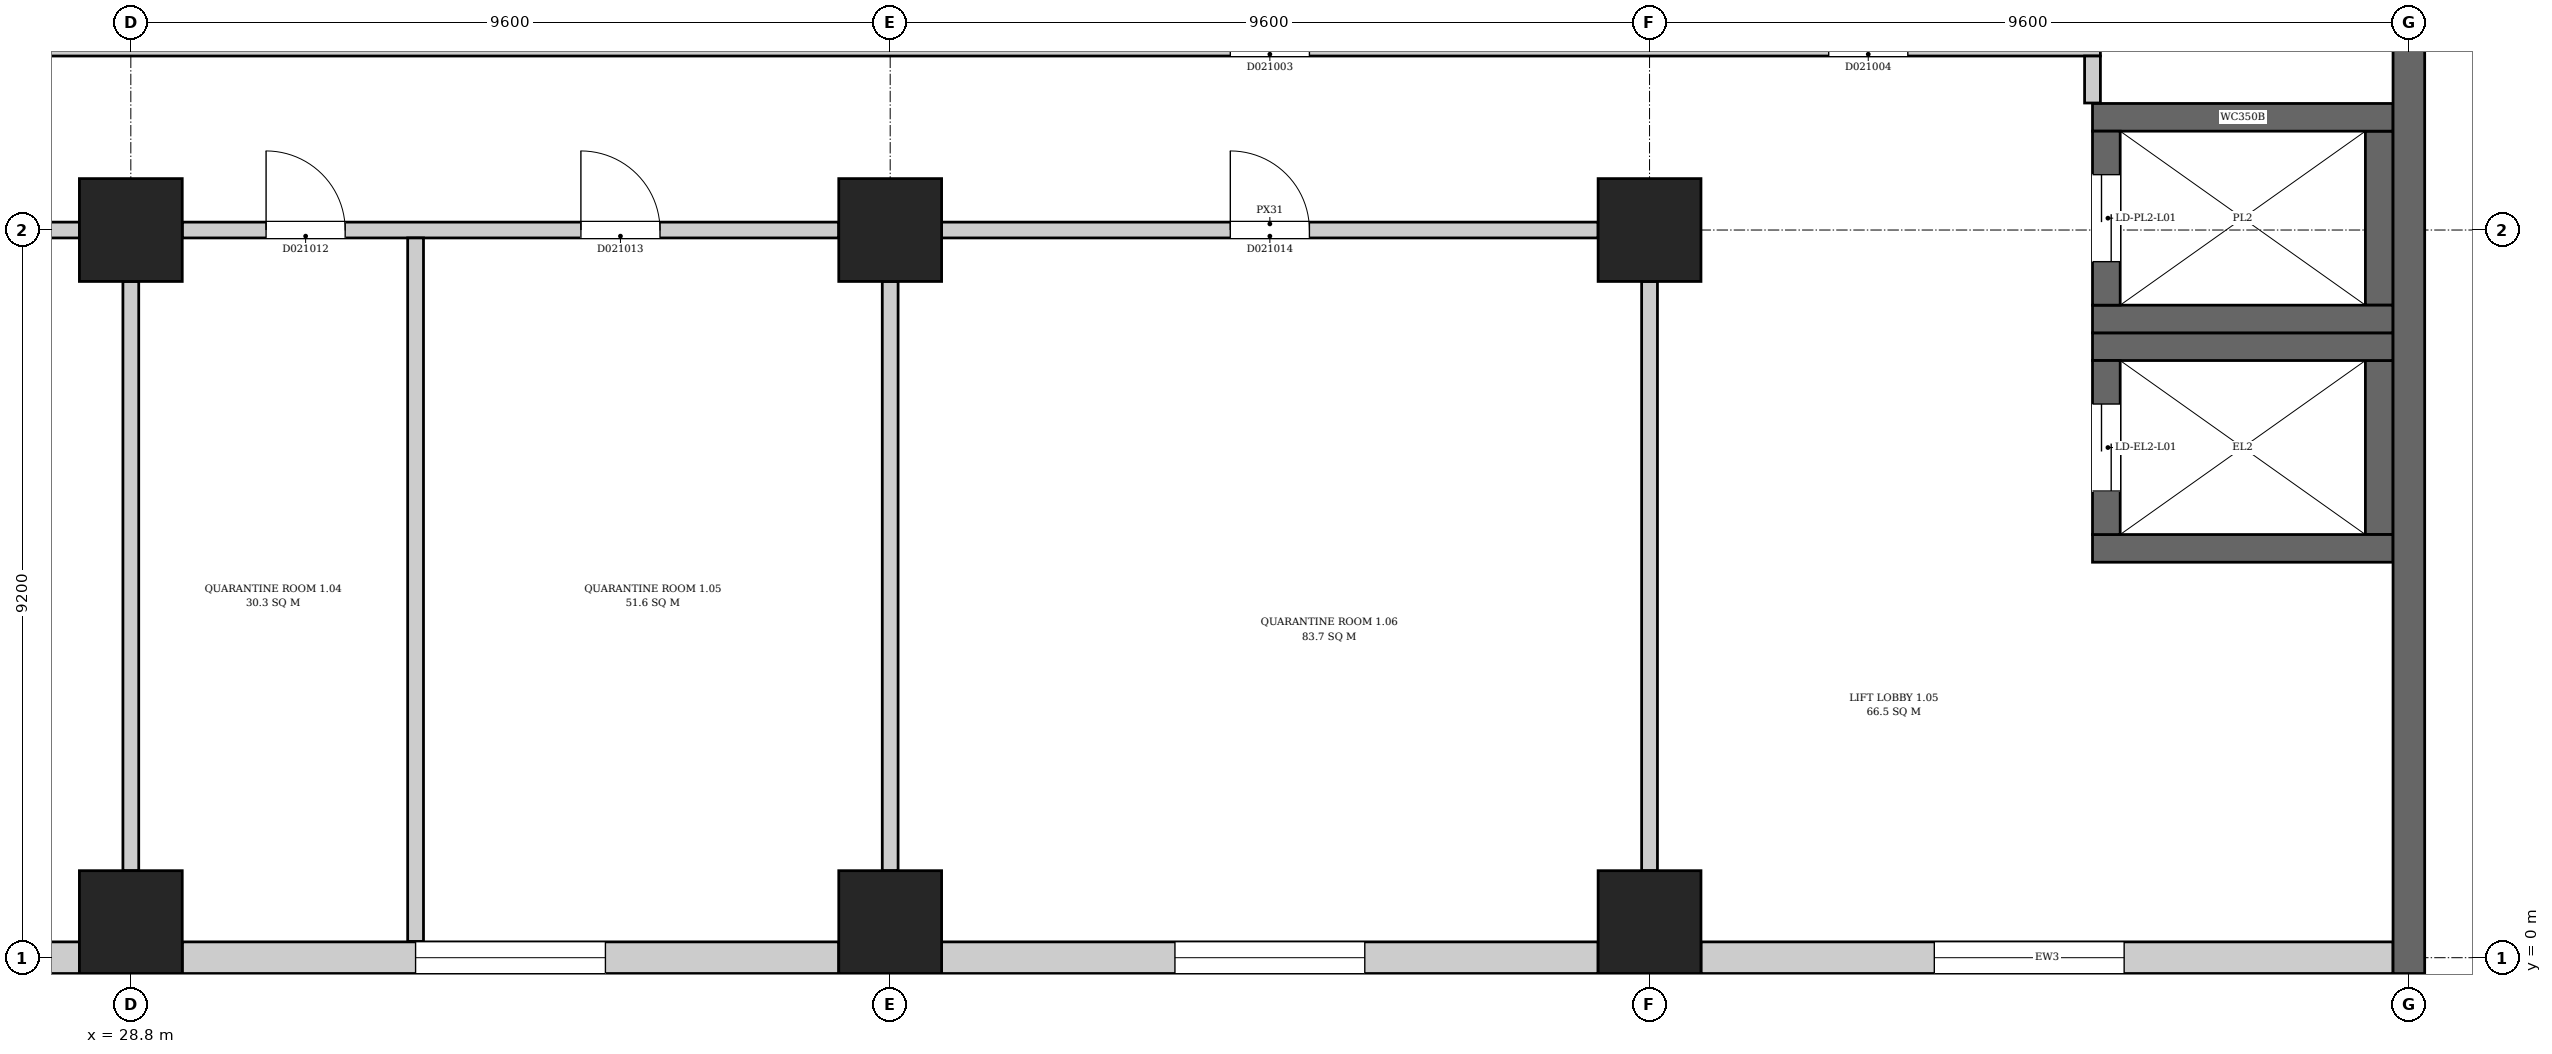
"""IFC4 building model, lengths in metres.
Left out: names, types, materials, properties, quantities, classifications, styles, units other than length and angle.
Written with IfcOpenShell. Run it as: python <this file> out.ifc"""

import sys

from ifc_helpers import new_model, si_unit, direction, frame, frame_2d, origin, origin_2d, place, context, subcontext, project, spatial, rectangle, extrude, element, fill, save


model = new_model("IFC4")
c1 = context("Model", 3, precision=1e-05, world=origin(), true_north=direction((0.0, 1.0)))
c2 = subcontext(c1, "Body", "Model", "MODEL_VIEW")
j1 = project(units=[si_unit("LENGTHUNIT", "METRE"), si_unit("PLANEANGLEUNIT", "RADIAN")], contexts=[c1])
p1 = place(None, origin())
s1 = spatial("IfcSite", under=j1, at=p1, CompositionType="ELEMENT")
p2 = place(p1, origin())
s2 = spatial("IfcBuilding", under=s1, at=p2, CompositionType="ELEMENT")
p3 = place(p2, frame((0.0, 0.0, 6.5)))
s3 = spatial("IfcBuildingStorey", under=s2, at=p3, CompositionType="ELEMENT", Elevation=6.5)
p4 = place(p3, frame((57.6, -0.2, 0.0), z_axis=(0.0, 0.0, 1.0), x_axis=(0.0, 1.0, 0.0)))
e1 = element("IfcWall", 1, at=p4, inside=s3, PredefinedType="SHEAR", context=c2, shape_type="SweptSolid", body=[
    extrude(rectangle(XDim=46.88, YDim=0.4, at=frame_2d((23.44, 0.0))), origin(), (0.0, 0.0, 1.0), 7.7),
])
for number, where, z_axis, x_axis in (
    (2, (53.6, 5.175, 0.0), (0.0, 0.0, 1.0), (1.0, 0.0, 0.0)),
    (3, (53.6, 7.725, 0.0), (0.0, 0.0, 1.0), (1.0, 0.0, 0.0)),
):
    element("IfcWall", number, at=place(p3, frame(where, z_axis=z_axis, x_axis=x_axis)), inside=s3, PredefinedType="SHEAR", context=c2, shape_type="SweptSolid", body=[
        extrude(rectangle(XDim=3.8, YDim=0.35, at=frame_2d((1.9, 0.0))), origin(), (0.0, 0.0, 1.0), 7.7),
    ])
p5 = place(p3, frame((53.775, 5.35, 0.0), z_axis=(0.0, 0.0, 1.0), x_axis=(0.0, 1.0, 0.0)))
e4 = element("IfcWall", 4, at=p5, inside=s3, PredefinedType="SHEAR", context=c2, shape_type="SweptSolid", body=[
    extrude(rectangle(XDim=2.2, YDim=0.35, at=frame_2d((1.1, 0.0))), origin(), (0.0, 0.0, 1.0), 7.7),
])
p6 = place(p5, frame((0.55, 0.0, 0.0)))
e5 = element("IfcOpeningElement", 5, at=p6, cuts=e4, PredefinedType="OPENING", context=c2, shape_type="SweptSolid", body=[
    extrude(rectangle(XDim=1.1, YDim=2.1, at=frame_2d((0.55, 1.05))), frame((0.0, 0.185, 0.0), z_axis=(0.0, -1.0, 0.0), x_axis=(1.0, 0.0, 0.0)), (0.0, 0.0, 1.0), 0.37),
])
p7 = place(p3, frame((57.225, 5.35, 0.0), z_axis=(0.0, 0.0, 1.0), x_axis=(0.0, 1.0, 0.0)))
e6 = element("IfcWall", 6, at=p7, inside=s3, PredefinedType="SHEAR", context=c2, shape_type="SweptSolid", body=[
    extrude(rectangle(XDim=2.2, YDim=0.35, at=frame_2d((1.1, 0.0))), origin(), (0.0, 0.0, 1.0), 7.7),
])
for number, where, z_axis, x_axis in (
    (7, (53.6, 8.075, 0.0), (0.0, 0.0, 1.0), (1.0, 0.0, 0.0)),
    (8, (53.6, 10.625, 0.0), (0.0, 0.0, 1.0), (1.0, 0.0, 0.0)),
):
    element("IfcWall", number, at=place(p3, frame(where, z_axis=z_axis, x_axis=x_axis)), inside=s3, PredefinedType="SHEAR", context=c2, shape_type="SweptSolid", body=[
        extrude(rectangle(XDim=3.8, YDim=0.35, at=frame_2d((1.9, 0.0))), origin(), (0.0, 0.0, 1.0), 7.7),
    ])
p8 = place(p3, frame((53.775, 8.25, 0.0), z_axis=(0.0, 0.0, 1.0), x_axis=(0.0, 1.0, 0.0)))
e9 = element("IfcWall", 9, at=p8, inside=s3, PredefinedType="SHEAR", context=c2, shape_type="SweptSolid", body=[
    extrude(rectangle(XDim=2.2, YDim=0.35, at=frame_2d((1.1, 0.0))), origin(), (0.0, 0.0, 1.0), 7.7),
])
p9 = place(p8, frame((0.55, 0.0, 0.0)))
e10 = element("IfcOpeningElement", 10, at=p9, cuts=e9, PredefinedType="OPENING", context=c2, shape_type="SweptSolid", body=[
    extrude(rectangle(XDim=1.1, YDim=2.1, at=frame_2d((0.55, 1.05))), frame((0.0, 0.185, 0.0), z_axis=(0.0, -1.0, 0.0), x_axis=(1.0, 0.0, 0.0)), (0.0, 0.0, 1.0), 0.37),
])
p10 = place(p3, frame((57.225, 8.25, 0.0), z_axis=(0.0, 0.0, 1.0), x_axis=(0.0, 1.0, 0.0)))
e11 = element("IfcWall", 11, at=p10, inside=s3, PredefinedType="SHEAR", context=c2, shape_type="SweptSolid", body=[
    extrude(rectangle(XDim=2.2, YDim=0.35, at=frame_2d((1.1, 0.0))), origin(), (0.0, 0.0, 1.0), 7.7),
])
for number, where, z_axis, x_axis in (
    (12, (28.8, 0.45, 0.0), (0.0, 0.0, 1.0), (1.0, 0.0, 0.0)),
    (13, (38.4, 0.45, 0.0), (0.0, 0.0, 1.0), (1.0, 0.0, 0.0)),
    (14, (48.0, 0.45, 0.0), (0.0, 0.0, 1.0), (1.0, 0.0, 0.0)),
    (15, (28.8, 9.2, 0.0), (0.0, 0.0, 1.0), (1.0, 0.0, 0.0)),
    (16, (38.4, 9.2, 0.0), (0.0, 0.0, 1.0), (1.0, 0.0, 0.0)),
    (17, (48.0, 9.2, 0.0), (0.0, 0.0, 1.0), (1.0, 0.0, 0.0)),
):
    element("IfcColumn", number, at=place(p3, frame(where, z_axis=z_axis, x_axis=x_axis)), inside=s3, PredefinedType="COLUMN", context=c2, shape_type="SweptSolid", body=[
        extrude(rectangle(XDim=1.3, YDim=1.3, at=origin_2d()), origin(), (0.0, 0.0, 1.0), 7.7),
    ])
p11 = place(p3, frame((19.85, 0.0, 0.0), z_axis=(0.0, 0.0, 1.0), x_axis=(1.0, 0.0, 0.0)))
e18 = element("IfcWall", 18, at=p11, inside=s3, PredefinedType="ELEMENTEDWALL", context=c2, shape_type="SweptSolid", body=[
    extrude(rectangle(XDim=8.3, YDim=0.4, at=frame_2d((4.15, 0.0))), origin(), (0.0, 0.0, 1.0), 7.35),
])
p12 = place(p11, frame((2.95, 0.0, 1.0)))
e19 = element("IfcOpeningElement", 19, at=p12, cuts=e18, PredefinedType="OPENING", context=c2, shape_type="SweptSolid", body=[
    extrude(rectangle(XDim=2.4, YDim=2.2, at=frame_2d((1.2, 1.1))), frame((0.0, 0.21, 0.0), z_axis=(0.0, -1.0, 0.0), x_axis=(1.0, 0.0, 0.0)), (0.0, 0.0, 1.0), 0.42),
])
p13 = place(p3, frame((29.45, 0.0, 0.0), z_axis=(0.0, 0.0, 1.0), x_axis=(1.0, 0.0, 0.0)))
e20 = element("IfcWall", 20, at=p13, inside=s3, PredefinedType="ELEMENTEDWALL", context=c2, shape_type="SweptSolid", body=[
    extrude(rectangle(XDim=8.3, YDim=0.4, at=frame_2d((4.15, 0.0))), origin(), (0.0, 0.0, 1.0), 7.35),
])
p14 = place(p13, frame((2.95, 0.0, 1.0)))
e21 = element("IfcOpeningElement", 21, at=p14, cuts=e20, PredefinedType="OPENING", context=c2, shape_type="SweptSolid", body=[
    extrude(rectangle(XDim=2.4, YDim=2.2, at=frame_2d((1.2, 1.1))), frame((0.0, 0.21, 0.0), z_axis=(0.0, -1.0, 0.0), x_axis=(1.0, 0.0, 0.0)), (0.0, 0.0, 1.0), 0.42),
])
p15 = place(p3, frame((39.05, 0.0, 0.0), z_axis=(0.0, 0.0, 1.0), x_axis=(1.0, 0.0, 0.0)))
e22 = element("IfcWall", 22, at=p15, inside=s3, PredefinedType="ELEMENTEDWALL", context=c2, shape_type="SweptSolid", body=[
    extrude(rectangle(XDim=8.3, YDim=0.4, at=frame_2d((4.15, 0.0))), origin(), (0.0, 0.0, 1.0), 7.35),
])
p16 = place(p15, frame((2.95, 0.0, 1.0)))
e23 = element("IfcOpeningElement", 23, at=p16, cuts=e22, PredefinedType="OPENING", context=c2, shape_type="SweptSolid", body=[
    extrude(rectangle(XDim=2.4, YDim=2.2, at=frame_2d((1.2, 1.1))), frame((0.0, 0.21, 0.0), z_axis=(0.0, -1.0, 0.0), x_axis=(1.0, 0.0, 0.0)), (0.0, 0.0, 1.0), 0.42),
])
p17 = place(p3, frame((48.65, 0.0, 0.0), z_axis=(0.0, 0.0, 1.0), x_axis=(1.0, 0.0, 0.0)))
e24 = element("IfcWall", 24, at=p17, inside=s3, PredefinedType="ELEMENTEDWALL", context=c2, shape_type="SweptSolid", body=[
    extrude(rectangle(XDim=8.75, YDim=0.4, at=frame_2d((4.375, 0.0))), origin(), (0.0, 0.0, 1.0), 7.35),
])
p18 = place(p17, frame((2.95, 0.0, 1.0)))
e25 = element("IfcOpeningElement", 25, at=p18, cuts=e24, PredefinedType="OPENING", context=c2, shape_type="SweptSolid", body=[
    extrude(rectangle(XDim=2.4, YDim=2.2, at=frame_2d((1.2, 1.1))), frame((0.0, 0.21, 0.0), z_axis=(0.0, -1.0, 0.0), x_axis=(1.0, 0.0, 0.0)), (0.0, 0.0, 1.0), 0.42),
])
p19 = place(p3, frame((19.85, 9.2, 0.0), z_axis=(0.0, 0.0, 1.0), x_axis=(1.0, 0.0, 0.0)))
e26 = element("IfcWall", 26, at=p19, inside=s3, PredefinedType="PARTITIONING", context=c2, shape_type="SweptSolid", body=[
    extrude(rectangle(XDim=8.3, YDim=0.2, at=frame_2d((4.15, 0.0))), origin(), (0.0, 0.0, 1.0), 6.95),
])
p20 = place(p19, frame((3.65, 0.0, 0.0)))
e27 = element("IfcOpeningElement", 27, at=p20, cuts=e26, PredefinedType="OPENING", context=c2, shape_type="SweptSolid", body=[
    extrude(rectangle(XDim=1.0, YDim=2.1, at=frame_2d((0.5, 1.05))), frame((0.0, 0.11, 0.0), z_axis=(0.0, -1.0, 0.0), x_axis=(1.0, 0.0, 0.0)), (0.0, 0.0, 1.0), 0.22),
])
p21 = place(p3, frame((27.206, 11.5, 0.0), z_axis=(0.0, 0.0, 1.0), x_axis=(1.0, 0.0, 0.0)))
e28 = element("IfcWall", 28, at=p21, inside=s3, PredefinedType="PARTITIONING", context=c2, shape_type="SweptSolid", body=[
    extrude(rectangle(XDim=26.494, YDim=0.2, at=frame_2d((13.247, 0.0))), origin(), (0.0, 0.0, 1.0), 7.35),
])
p22 = place(p21, frame((15.494, 0.0, 0.0)))
e29 = element("IfcOpeningElement", 29, at=p22, cuts=e28, PredefinedType="OPENING", context=c2, shape_type="SweptSolid", body=[
    extrude(rectangle(XDim=1.0, YDim=2.1, at=frame_2d((0.5, 1.05))), frame((0.0, 0.11, 0.0), z_axis=(0.0, -1.0, 0.0), x_axis=(1.0, 0.0, 0.0)), (0.0, 0.0, 1.0), 0.22),
])
p23 = place(p21, frame((23.059, 0.0, 0.0)))
e30 = element("IfcOpeningElement", 30, at=p23, cuts=e28, PredefinedType="OPENING", context=c2, shape_type="SweptSolid", body=[
    extrude(rectangle(XDim=1.0, YDim=2.1, at=frame_2d((0.5, 1.05))), frame((0.0, 0.11, 0.0), z_axis=(0.0, -1.0, 0.0), x_axis=(1.0, 0.0, 0.0)), (0.0, 0.0, 1.0), 0.22),
])
p24 = place(p3, frame((28.8, 1.1, 0.0), z_axis=(0.0, 0.0, 1.0), x_axis=(0.0, 1.0, 0.0)))
e31 = element("IfcWall", 31, at=p24, inside=s3, PredefinedType="PARTITIONING", context=c2, shape_type="SweptSolid", body=[
    extrude(rectangle(XDim=7.45, YDim=0.2, at=frame_2d((3.725, 0.0))), origin(), (0.0, 0.0, 1.0), 6.95),
])
p25 = place(p3, frame((29.45, 9.2, 0.0), z_axis=(0.0, 0.0, 1.0), x_axis=(1.0, 0.0, 0.0)))
e32 = element("IfcWall", 32, at=p25, inside=s3, PredefinedType="PARTITIONING", context=c2, shape_type="SweptSolid", body=[
    extrude(rectangle(XDim=8.3, YDim=0.2, at=frame_2d((4.15, 0.0))), origin(), (0.0, 0.0, 1.0), 6.95),
])
p26 = place(p25, frame((1.06, 0.0, 0.0)))
e33 = element("IfcOpeningElement", 33, at=p26, cuts=e32, PredefinedType="OPENING", context=c2, shape_type="SweptSolid", body=[
    extrude(rectangle(XDim=1.0, YDim=2.1, at=frame_2d((0.5, 1.05))), frame((0.0, 0.11, 0.0), z_axis=(0.0, -1.0, 0.0), x_axis=(1.0, 0.0, 0.0)), (0.0, 0.0, 1.0), 0.22),
])
p27 = place(p25, frame((5.04, 0.0, 0.0)))
e34 = element("IfcOpeningElement", 34, at=p27, cuts=e32, PredefinedType="OPENING", context=c2, shape_type="SweptSolid", body=[
    extrude(rectangle(XDim=1.0, YDim=2.1, at=frame_2d((0.5, 1.05))), frame((0.0, 0.11, 0.0), z_axis=(0.0, -1.0, 0.0), x_axis=(1.0, 0.0, 0.0)), (0.0, 0.0, 1.0), 0.22),
])
p28 = place(p3, frame((32.4, 0.206, 0.0), z_axis=(0.0, 0.0, 1.0), x_axis=(0.0, 1.0, 0.0)))
e35 = element("IfcWall", 35, at=p28, inside=s3, PredefinedType="PARTITIONING", context=c2, shape_type="SweptSolid", body=[
    extrude(rectangle(XDim=8.894, YDim=0.2, at=frame_2d((4.447, 0.0))), origin(), (0.0, 0.0, 1.0), 7.35),
])
p29 = place(p3, frame((38.4, 1.1, 0.0), z_axis=(0.0, 0.0, 1.0), x_axis=(0.0, 1.0, 0.0)))
e36 = element("IfcWall", 36, at=p29, inside=s3, PredefinedType="PARTITIONING", context=c2, shape_type="SweptSolid", body=[
    extrude(rectangle(XDim=7.45, YDim=0.2, at=frame_2d((3.725, 0.0))), origin(), (0.0, 0.0, 1.0), 6.95),
])
p30 = place(p3, frame((39.05, 9.2, 0.0), z_axis=(0.0, 0.0, 1.0), x_axis=(1.0, 0.0, 0.0)))
e37 = element("IfcWall", 37, at=p30, inside=s3, PredefinedType="PARTITIONING", context=c2, shape_type="SweptSolid", body=[
    extrude(rectangle(XDim=8.3, YDim=0.2, at=frame_2d((4.15, 0.0))), origin(), (0.0, 0.0, 1.0), 6.95),
])
p31 = place(p30, frame((3.65, 0.0, 0.0)))
e38 = element("IfcOpeningElement", 38, at=p31, cuts=e37, PredefinedType="OPENING", context=c2, shape_type="SweptSolid", body=[
    extrude(rectangle(XDim=1.0, YDim=2.1, at=frame_2d((0.5, 1.05))), frame((0.0, 0.11, 0.0), z_axis=(0.0, -1.0, 0.0), x_axis=(1.0, 0.0, 0.0)), (0.0, 0.0, 1.0), 0.22),
])
p32 = place(p3, frame((48.0, 1.1, 0.0), z_axis=(0.0, 0.0, 1.0), x_axis=(0.0, 1.0, 0.0)))
e39 = element("IfcWall", 39, at=p32, inside=s3, PredefinedType="PARTITIONING", context=c2, shape_type="SweptSolid", body=[
    extrude(rectangle(XDim=7.45, YDim=0.2, at=frame_2d((3.725, 0.0))), origin(), (0.0, 0.0, 1.0), 6.95),
])
p33 = place(p3, frame((53.6, 10.806, 0.0), z_axis=(0.0, 0.0, 1.0), x_axis=(0.0, 1.0, 0.0)))
e40 = element("IfcWall", 40, at=p33, inside=s3, PredefinedType="PARTITIONING", context=c2, shape_type="SweptSolid", body=[
    extrude(rectangle(XDim=0.594, YDim=0.2, at=frame_2d((0.297, 0.0))), origin(), (0.0, 0.0, 1.0), 7.35),
])
p34 = place(p14, origin())
e41 = element("IfcWindow", 41, at=p34, inside=s3, PartitioningType="SINGLE_PANEL", PredefinedType="WINDOW", context=c2, shape_type="SweptSolid", body=[
    extrude(rectangle(XDim=2.4, YDim=2.2, at=frame_2d((1.2, 1.1))), frame((0.0, 0.03, 0.0), z_axis=(0.0, -1.0, 0.0), x_axis=(1.0, 0.0, 0.0)), (0.0, 0.0, 1.0), 0.06),
])
fill(e21, e41)
p35 = place(p16, origin())
e42 = element("IfcWindow", 42, at=p35, inside=s3, PartitioningType="SINGLE_PANEL", PredefinedType="WINDOW", context=c2, shape_type="SweptSolid", body=[
    extrude(rectangle(XDim=2.4, YDim=2.2, at=frame_2d((1.2, 1.1))), frame((0.0, 0.03, 0.0), z_axis=(0.0, -1.0, 0.0), x_axis=(1.0, 0.0, 0.0)), (0.0, 0.0, 1.0), 0.06),
])
fill(e23, e42)
p36 = place(p18, origin())
e43 = element("IfcWindow", 43, at=p36, inside=s3, PartitioningType="SINGLE_PANEL", PredefinedType="WINDOW", context=c2, shape_type="SweptSolid", body=[
    extrude(rectangle(XDim=2.4, YDim=2.2, at=frame_2d((1.2, 1.1))), frame((0.0, 0.03, 0.0), z_axis=(0.0, -1.0, 0.0), x_axis=(1.0, 0.0, 0.0)), (0.0, 0.0, 1.0), 0.06),
])
fill(e25, e43)
p37 = place(p6, origin())
e44 = element("IfcDoor", 44, at=p37, inside=s3, OperationType="DOUBLE_DOOR_SLIDING", PredefinedType="DOOR", context=c2, shape_type="SweptSolid", body=[
    extrude(rectangle(XDim=1.1, YDim=2.1, at=frame_2d((0.55, 1.05))), frame((0.0, 0.025, 0.0), z_axis=(0.0, -1.0, 0.0), x_axis=(1.0, 0.0, 0.0)), (0.0, 0.0, 1.0), 0.05),
])
fill(e5, e44)
p38 = place(p9, origin())
e45 = element("IfcDoor", 45, at=p38, inside=s3, OperationType="DOUBLE_DOOR_SLIDING", PredefinedType="DOOR", context=c2, shape_type="SweptSolid", body=[
    extrude(rectangle(XDim=1.1, YDim=2.1, at=frame_2d((0.55, 1.05))), frame((0.0, 0.025, 0.0), z_axis=(0.0, -1.0, 0.0), x_axis=(1.0, 0.0, 0.0)), (0.0, 0.0, 1.0), 0.05),
])
fill(e10, e45)
p39 = place(p26, origin())
e46 = element("IfcDoor", 46, at=p39, inside=s3, OperationType="SINGLE_SWING_LEFT", PredefinedType="DOOR", context=c2, shape_type="SweptSolid", body=[
    extrude(rectangle(XDim=1.0, YDim=2.1, at=frame_2d((0.5, 1.05))), frame((0.0, 0.025, 0.0), z_axis=(0.0, -1.0, 0.0), x_axis=(1.0, 0.0, 0.0)), (0.0, 0.0, 1.0), 0.05),
])
fill(e33, e46)
p40 = place(p27, origin())
e47 = element("IfcDoor", 47, at=p40, inside=s3, OperationType="SINGLE_SWING_RIGHT", PredefinedType="DOOR", context=c2, shape_type="SweptSolid", body=[
    extrude(rectangle(XDim=1.0, YDim=2.1, at=frame_2d((0.5, 1.05))), frame((0.0, 0.025, 0.0), z_axis=(0.0, -1.0, 0.0), x_axis=(1.0, 0.0, 0.0)), (0.0, 0.0, 1.0), 0.05),
])
fill(e34, e47)
p41 = place(p31, origin())
e48 = element("IfcDoor", 48, at=p41, inside=s3, OperationType="SINGLE_SWING_RIGHT", PredefinedType="DOOR", context=c2, shape_type="SweptSolid", body=[
    extrude(rectangle(XDim=1.0, YDim=2.1, at=frame_2d((0.5, 1.05))), frame((0.0, 0.025, 0.0), z_axis=(0.0, -1.0, 0.0), x_axis=(1.0, 0.0, 0.0)), (0.0, 0.0, 1.0), 0.05),
])
fill(e38, e48)
save(model, sys.argv[1])
